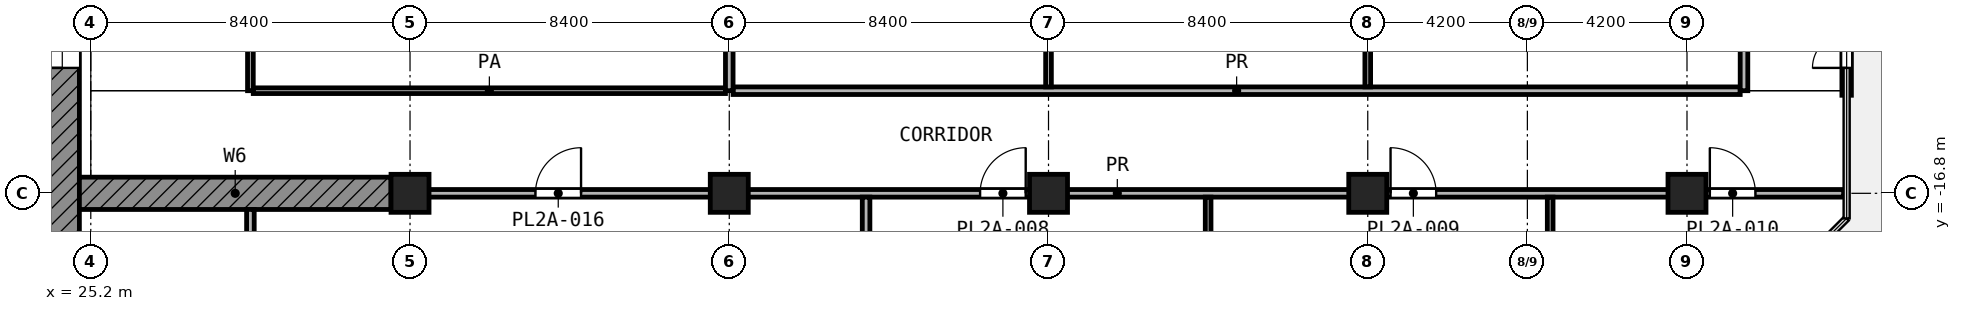
"""IFC4 building model, lengths in metres.
Left out: names, types, materials, properties, quantities, classifications, styles, units other than length and angle.
Written with IfcOpenShell. Run it as: python <this file> out.ifc"""

import sys

from ifc_helpers import new_model, si_unit, direction, frame, frame_2d, origin, origin_2d, place, context, subcontext, project, spatial, rectangle, extrude, element, fill, save


model = new_model("IFC4")
c1 = context("Model", 3, precision=1e-05, world=origin(), true_north=direction((0.0, 1.0)))
c2 = subcontext(c1, "Body", "Model", "MODEL_VIEW")
j1 = project(units=[si_unit("LENGTHUNIT", "METRE"), si_unit("PLANEANGLEUNIT", "RADIAN")], contexts=[c1])
p1 = place(None, origin())
s1 = spatial("IfcSite", under=j1, at=p1, CompositionType="ELEMENT")
p2 = place(p1, origin())
s2 = spatial("IfcBuilding", under=s1, at=p2, CompositionType="ELEMENT")
p3 = place(p2, frame((0.0, 0.0, 153.4)))
s3 = spatial("IfcBuildingStorey", under=s2, at=p3, CompositionType="ELEMENT", Elevation=153.4)
for number, where, z_axis, x_axis in (
    (1, (33.6, -16.8, 0.0), (0.0, 0.0, 1.0), (1.0, 0.0, 0.0)),
    (2, (42.0, -16.8, 0.0), (0.0, 0.0, 1.0), (1.0, 0.0, 0.0)),
    (3, (50.4, -16.8, 0.0), (0.0, 0.0, 1.0), (1.0, 0.0, 0.0)),
    (4, (58.8, -16.8, 0.0), (0.0, 0.0, 1.0), (1.0, 0.0, 0.0)),
    (5, (67.2, -16.8, 0.0), (0.0, 0.0, 1.0), (1.0, 0.0, 0.0)),
):
    element("IfcColumn", number, at=place(p3, frame(where, z_axis=z_axis, x_axis=x_axis)), inside=s3, PredefinedType="COLUMN", context=c2, shape_type="SweptSolid", body=[
        extrude(rectangle(XDim=1.0, YDim=1.0, at=origin_2d()), origin(), (0.0, 0.0, 1.0), 5.0),
    ])
p4 = place(p3, frame((24.9, -16.8, 0.0), z_axis=(0.0, 0.0, 1.0), x_axis=(1.0, 0.0, 0.0)))
e6 = element("IfcWall", 6, at=p4, inside=s3, PredefinedType="SHEAR", context=c2, shape_type="SweptSolid", body=[
    extrude(rectangle(XDim=8.2, YDim=0.85, at=frame_2d((4.1, 0.0))), origin(), (0.0, 0.0, 1.0), 4.4),
])
p5 = place(p3, frame((71.401, -14.22, 0.0), z_axis=(0.0, 0.0, 1.0), x_axis=(0.0, 1.0, 0.0)))
e7 = element("IfcWall", 7, at=p5, inside=s3, PredefinedType="SOLIDWALL", context=c2, shape_type="SweptSolid", body=[
    extrude(rectangle(XDim=3.24, YDim=0.25, at=frame_2d((1.62, 0.0))), origin(), (0.0, 0.0, 1.0), 4.24),
])
p6 = place(p5, frame((0.72, 0.0, 0.0)))
e8 = element("IfcOpeningElement", 8, at=p6, cuts=e7, PredefinedType="OPENING", context=c2, shape_type="SweptSolid", body=[
    extrude(rectangle(XDim=1.8, YDim=2.1, at=frame_2d((0.9, 1.05))), frame((0.0, 0.135, 0.0), z_axis=(0.0, -1.0, 0.0), x_axis=(1.0, 0.0, 0.0)), (0.0, 0.0, 1.0), 0.27),
])
p7 = place(p3, frame((24.45, -24.0, 0.0), z_axis=(0.0, 0.0, 1.0), x_axis=(0.0, 1.0, 0.0)))
e9 = element("IfcWall", 9, at=p7, inside=s3, PredefinedType="SHEAR", context=c2, shape_type="SweptSolid", body=[
    extrude(rectangle(XDim=18.6, YDim=0.9, at=frame_2d((9.3, 0.0))), origin(), (0.0, 0.0, 1.0), 4.4),
])
p8 = place(p7, frame((10.5, 0.0, 0.0)))
e10 = element("IfcOpeningElement", 10, at=p8, cuts=e9, PredefinedType="OPENING", context=c2, shape_type="SweptSolid", body=[
    extrude(rectangle(XDim=1.8, YDim=2.1, at=frame_2d((0.9, 1.05))), frame((0.0, 0.46, 0.0), z_axis=(0.0, -1.0, 0.0), x_axis=(1.0, 0.0, 0.0)), (0.0, 0.0, 1.0), 0.92),
])
p9 = place(p3, frame((29.475, -14.1, 0.0), z_axis=(0.0, 0.0, 1.0), x_axis=(1.0, 0.0, 0.0)))
e11 = element("IfcWall", 11, at=p9, inside=s3, PredefinedType="PARTITIONING", context=c2, shape_type="SweptSolid", body=[
    extrude(rectangle(XDim=12.425, YDim=0.15, at=frame_2d((6.212, 0.0))), origin(), (0.0, 0.0, 1.0), 4.4),
])
p10 = place(p3, frame((29.4, -14.1, 0.0), z_axis=(0.0, 0.0, 1.0), x_axis=(0.0, 1.0, 0.0)))
e12 = element("IfcWall", 12, at=p10, inside=s3, PredefinedType="PARTITIONING", context=c2, shape_type="SweptSolid", body=[
    extrude(rectangle(XDim=2.997, YDim=0.15, at=frame_2d((1.499, 0.0))), origin(), (0.0, 0.0, 1.0), 4.4),
])
p11 = place(p3, frame((50.4, -14.0, 0.0), z_axis=(0.0, 0.0, 1.0), x_axis=(0.0, 1.0, 0.0)))
e13 = element("IfcWall", 13, at=p11, inside=s3, PredefinedType="PARTITIONING", context=c2, shape_type="SweptSolid", body=[
    extrude(rectangle(XDim=2.8, YDim=0.15, at=frame_2d((1.4, 0.0))), origin(), (0.0, 0.0, 1.0), 4.4),
])
p12 = place(p3, frame((54.6, -20.92, 0.0), z_axis=(0.0, 0.0, 1.0), x_axis=(0.0, 1.0, 0.0)))
e14 = element("IfcWall", 14, at=p12, inside=s3, PredefinedType="PARTITIONING", context=c2, shape_type="SweptSolid", body=[
    extrude(rectangle(XDim=4.02, YDim=0.15, at=frame_2d((2.01, 0.0))), origin(), (0.0, 0.0, 1.0), 4.4),
])
p13 = place(p3, frame((58.8, -14.0, 0.0), z_axis=(0.0, 0.0, 1.0), x_axis=(0.0, 1.0, 0.0)))
e15 = element("IfcWall", 15, at=p13, inside=s3, PredefinedType="PARTITIONING", context=c2, shape_type="SweptSolid", body=[
    extrude(rectangle(XDim=2.8, YDim=0.15, at=frame_2d((1.4, 0.0))), origin(), (0.0, 0.0, 1.0), 4.4),
])
p14 = place(p3, frame((63.6, -20.92, 0.0), z_axis=(0.0, 0.0, 1.0), x_axis=(0.0, 1.0, 0.0)))
e16 = element("IfcWall", 16, at=p14, inside=s3, PredefinedType="PARTITIONING", context=c2, shape_type="SweptSolid", body=[
    extrude(rectangle(XDim=4.02, YDim=0.15, at=frame_2d((2.01, 0.0))), origin(), (0.0, 0.0, 1.0), 4.4),
])
p15 = place(p3, frame((33.1, -16.8, 0.0), z_axis=(0.0, 0.0, 1.0), x_axis=(1.0, 0.0, 0.0)))
e17 = element("IfcWall", 17, at=p15, inside=s3, PredefinedType="PARTITIONING", context=c2, shape_type="SweptSolid", body=[
    extrude(rectangle(XDim=38.221, YDim=0.2, at=frame_2d((19.11, 0.0))), origin(), (0.0, 0.0, 1.0), 4.4),
])
p16 = place(p15, frame((3.8, 0.0, 0.0)))
e18 = element("IfcOpeningElement", 18, at=p16, cuts=e17, PredefinedType="OPENING", context=c2, shape_type="SweptSolid", body=[
    extrude(rectangle(XDim=1.2, YDim=2.1, at=frame_2d((0.6, 1.05))), frame((0.0, 0.11, 0.0), z_axis=(0.0, -1.0, 0.0), x_axis=(1.0, 0.0, 0.0)), (0.0, 0.0, 1.0), 0.22),
])
p17 = place(p15, frame((15.5, 0.0, 0.0)))
e19 = element("IfcOpeningElement", 19, at=p17, cuts=e17, PredefinedType="OPENING", context=c2, shape_type="SweptSolid", body=[
    extrude(rectangle(XDim=1.2, YDim=2.1, at=frame_2d((0.6, 1.05))), frame((0.0, 0.11, 0.0), z_axis=(0.0, -1.0, 0.0), x_axis=(1.0, 0.0, 0.0)), (0.0, 0.0, 1.0), 0.22),
])
p18 = place(p15, frame((26.3, 0.0, 0.0)))
e20 = element("IfcOpeningElement", 20, at=p18, cuts=e17, PredefinedType="OPENING", context=c2, shape_type="SweptSolid", body=[
    extrude(rectangle(XDim=1.2, YDim=2.1, at=frame_2d((0.6, 1.05))), frame((0.0, 0.11, 0.0), z_axis=(0.0, -1.0, 0.0), x_axis=(1.0, 0.0, 0.0)), (0.0, 0.0, 1.0), 0.22),
])
p19 = place(p15, frame((34.701, 0.0, 0.0)))
e21 = element("IfcOpeningElement", 21, at=p19, cuts=e17, PredefinedType="OPENING", context=c2, shape_type="SweptSolid", body=[
    extrude(rectangle(XDim=1.2, YDim=2.1, at=frame_2d((0.6, 1.05))), frame((0.0, 0.11, 0.0), z_axis=(0.0, -1.0, 0.0), x_axis=(1.0, 0.0, 0.0)), (0.0, 0.0, 1.0), 0.22),
])
p20 = place(p3, frame((42.1, -14.1, 0.0), z_axis=(0.0, 0.0, 1.0), x_axis=(1.0, 0.0, 0.0)))
e22 = element("IfcWall", 22, at=p20, inside=s3, PredefinedType="PARTITIONING", context=c2, shape_type="SweptSolid", body=[
    extrude(rectangle(XDim=26.5, YDim=0.2, at=frame_2d((13.25, 0.0))), origin(), (0.0, 0.0, 1.0), 4.4),
])
p21 = place(p3, frame((29.4, -20.947, 0.0), z_axis=(0.0, 0.0, 1.0), x_axis=(0.0, 1.0, 0.0)))
e23 = element("IfcWall", 23, at=p21, inside=s3, PredefinedType="PARTITIONING", context=c2, shape_type="SweptSolid", body=[
    extrude(rectangle(XDim=3.723, YDim=0.2, at=frame_2d((1.861, 0.0))), origin(), (0.0, 0.0, 1.0), 4.4),
])
p22 = place(p3, frame((42.0, -14.1, 0.0), z_axis=(0.0, 0.0, 1.0), x_axis=(0.0, 1.0, 0.0)))
e24 = element("IfcWall", 24, at=p22, inside=s3, PredefinedType="PARTITIONING", context=c2, shape_type="SweptSolid", body=[
    extrude(rectangle(XDim=3.0, YDim=0.2, at=frame_2d((1.5, 0.0))), origin(), (0.0, 0.0, 1.0), 4.4),
])
p23 = place(p3, frame((45.6, -20.92, 0.0), z_axis=(0.0, 0.0, 1.0), x_axis=(0.0, 1.0, 0.0)))
e25 = element("IfcWall", 25, at=p23, inside=s3, PredefinedType="PARTITIONING", context=c2, shape_type="SweptSolid", body=[
    extrude(rectangle(XDim=4.02, YDim=0.2, at=frame_2d((2.01, 0.0))), origin(), (0.0, 0.0, 1.0), 4.4),
])
p24 = place(p3, frame((68.7, -14.1, 0.0), z_axis=(0.0, 0.0, 1.0), x_axis=(0.0, 1.0, 0.0)))
e26 = element("IfcWall", 26, at=p24, inside=s3, PredefinedType="PARTITIONING", context=c2, shape_type="SweptSolid", body=[
    extrude(rectangle(XDim=2.997, YDim=0.2, at=frame_2d((1.499, 0.0))), origin(), (0.0, 0.0, 1.0), 4.4),
])
p25 = place(p6, origin())
e27 = element("IfcDoor", 27, at=p25, inside=s3, OperationType="DOUBLE_DOOR_SINGLE_SWING", PredefinedType="DOOR", context=c2, shape_type="SweptSolid", body=[
    extrude(rectangle(XDim=1.8, YDim=2.1, at=frame_2d((0.9, 1.05))), frame((0.0, 0.025, 0.0), z_axis=(0.0, -1.0, 0.0), x_axis=(1.0, 0.0, 0.0)), (0.0, 0.0, 1.0), 0.05),
])
fill(e8, e27)
p26 = place(p8, origin())
e28 = element("IfcDoor", 28, at=p26, inside=s3, OperationType="DOUBLE_DOOR_SINGLE_SWING", PredefinedType="DOOR", context=c2, shape_type="SweptSolid", body=[
    extrude(rectangle(XDim=1.8, YDim=2.1, at=frame_2d((0.9, 1.05))), frame((0.0, 0.025, 0.0), z_axis=(0.0, -1.0, 0.0), x_axis=(1.0, 0.0, 0.0)), (0.0, 0.0, 1.0), 0.05),
])
fill(e10, e28)
p27 = place(p16, origin())
e29 = element("IfcDoor", 29, at=p27, inside=s3, OperationType="SINGLE_SWING_RIGHT", PredefinedType="DOOR", context=c2, shape_type="SweptSolid", body=[
    extrude(rectangle(XDim=1.2, YDim=2.1, at=frame_2d((0.6, 1.05))), frame((0.0, 0.025, 0.0), z_axis=(0.0, -1.0, 0.0), x_axis=(1.0, 0.0, 0.0)), (0.0, 0.0, 1.0), 0.05),
])
fill(e18, e29)
p28 = place(p17, origin())
e30 = element("IfcDoor", 30, at=p28, inside=s3, OperationType="SINGLE_SWING_RIGHT", PredefinedType="DOOR", context=c2, shape_type="SweptSolid", body=[
    extrude(rectangle(XDim=1.2, YDim=2.1, at=frame_2d((0.6, 1.05))), frame((0.0, 0.025, 0.0), z_axis=(0.0, -1.0, 0.0), x_axis=(1.0, 0.0, 0.0)), (0.0, 0.0, 1.0), 0.05),
])
fill(e19, e30)
p29 = place(p18, origin())
e31 = element("IfcDoor", 31, at=p29, inside=s3, OperationType="SINGLE_SWING_LEFT", PredefinedType="DOOR", context=c2, shape_type="SweptSolid", body=[
    extrude(rectangle(XDim=1.2, YDim=2.1, at=frame_2d((0.6, 1.05))), frame((0.0, 0.025, 0.0), z_axis=(0.0, -1.0, 0.0), x_axis=(1.0, 0.0, 0.0)), (0.0, 0.0, 1.0), 0.05),
])
fill(e20, e31)
p30 = place(p19, origin())
e32 = element("IfcDoor", 32, at=p30, inside=s3, OperationType="SINGLE_SWING_LEFT", PredefinedType="DOOR", context=c2, shape_type="SweptSolid", body=[
    extrude(rectangle(XDim=1.2, YDim=2.1, at=frame_2d((0.6, 1.05))), frame((0.0, 0.025, 0.0), z_axis=(0.0, -1.0, 0.0), x_axis=(1.0, 0.0, 0.0)), (0.0, 0.0, 1.0), 0.05),
])
fill(e21, e32)
save(model, sys.argv[1])
